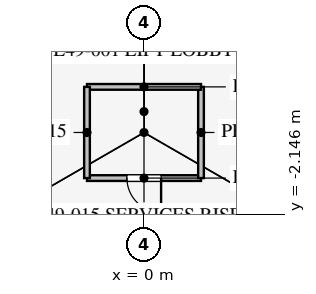
"""IFC4 building model, lengths in metres.
Left out: names, types, materials, properties, quantities, classifications, styles, units other than length and angle.
Written with IfcOpenShell. Run it as: python <this file> out.ifc"""

import sys

from ifc_helpers import new_model, si_unit, direction, frame, frame_2d, origin, place, context, subcontext, project, spatial, rectangle, extrude, element, fill, save


model = new_model("IFC4")
c1 = context("Model", 3, precision=1e-05, world=origin(), true_north=direction((0.0, 1.0)))
c2 = subcontext(c1, "Body", "Model", "MODEL_VIEW")
j1 = project(units=[si_unit("LENGTHUNIT", "METRE"), si_unit("PLANEANGLEUNIT", "RADIAN")], contexts=[c1])
p1 = place(None, origin())
s1 = spatial("IfcSite", under=j1, at=p1, CompositionType="ELEMENT")
p2 = place(p1, origin())
s2 = spatial("IfcBuilding", under=s1, at=p2, CompositionType="ELEMENT")
p3 = place(p2, frame((0.0, 0.0, 214.9)))
s3 = spatial("IfcBuildingStorey", under=s2, at=p3, CompositionType="ELEMENT", Elevation=214.9)
p4 = place(p3, frame((-1.5, -1.2, 0.0), z_axis=(0.0, 0.0, 1.0), x_axis=(1.0, 0.0, 0.0)))
e1 = element("IfcWall", 1, at=p4, inside=s3, PredefinedType="PARTITIONING", context=c2, shape_type="SweptSolid", body=[
    extrude(rectangle(XDim=3.0, YDim=0.15, at=frame_2d((1.5, 0.0))), origin(), (0.0, 0.0, 1.0), 4.0),
])
p5 = place(p4, frame((1.05, 0.0, 0.0)))
e2 = element("IfcOpeningElement", 2, at=p5, cuts=e1, PredefinedType="OPENING", context=c2, shape_type="SweptSolid", body=[
    extrude(rectangle(XDim=0.9, YDim=2.1, at=frame_2d((0.45, 1.05))), frame((0.0, 0.085, 0.0), z_axis=(0.0, -1.0, 0.0), x_axis=(1.0, 0.0, 0.0)), (0.0, 0.0, 1.0), 0.17),
])
p6 = place(p3, frame((1.5, -1.2, 0.0), z_axis=(0.0, 0.0, 1.0), x_axis=(0.0, 1.0, 0.0)))
e3 = element("IfcWall", 3, at=p6, inside=s3, PredefinedType="PARTITIONING", context=c2, shape_type="SweptSolid", body=[
    extrude(rectangle(XDim=2.4, YDim=0.15, at=frame_2d((1.2, 0.0))), origin(), (0.0, 0.0, 1.0), 4.0),
])
p7 = place(p3, frame((1.5, 1.2, 0.0), z_axis=(0.0, 0.0, 1.0), x_axis=(-1.0, 0.0, 0.0)))
e4 = element("IfcWall", 4, at=p7, inside=s3, PredefinedType="PARTITIONING", context=c2, shape_type="SweptSolid", body=[
    extrude(rectangle(XDim=3.0, YDim=0.15, at=frame_2d((1.5, 0.0))), origin(), (0.0, 0.0, 1.0), 4.0),
])
p8 = place(p3, frame((-1.5, 1.2, 0.0), z_axis=(0.0, 0.0, 1.0), x_axis=(0.0, -1.0, 0.0)))
e5 = element("IfcWall", 5, at=p8, inside=s3, PredefinedType="PARTITIONING", context=c2, shape_type="SweptSolid", body=[
    extrude(rectangle(XDim=2.4, YDim=0.15, at=frame_2d((1.2, 0.0))), origin(), (0.0, 0.0, 1.0), 4.0),
])
p9 = place(p3, frame((-0.016, 30.491, 0.0), z_axis=(0.0, 0.0, 1.0), x_axis=(-0.50000091641, -0.866024874695, 0.0)))
e6 = element("IfcWall", 6, at=p9, inside=s3, PredefinedType="PARTITIONING", context=c2, shape_type="SweptSolid", body=[
    extrude(rectangle(XDim=52.796, YDim=0.12, at=frame_2d((26.398, 0.0))), origin(), (0.0, 0.0, 1.0), 2.9),
])
p10 = place(p9, frame((10.2, 0.0, 0.15)))
e7 = element("IfcOpeningElement", 7, at=p10, cuts=e6, PredefinedType="OPENING", context=c2, shape_type="SweptSolid", body=[
    extrude(rectangle(XDim=1.8, YDim=2.1, at=frame_2d((0.9, 1.05))), frame((0.0, 0.07, 0.0), z_axis=(0.0, -1.0, 0.0), x_axis=(1.0, 0.0, 0.0)), (0.0, 0.0, 1.0), 0.14),
])
p11 = place(p9, frame((40.8, 0.0, 0.15)))
e8 = element("IfcOpeningElement", 8, at=p11, cuts=e6, PredefinedType="OPENING", context=c2, shape_type="SweptSolid", body=[
    extrude(rectangle(XDim=1.8, YDim=2.1, at=frame_2d((0.9, 1.05))), frame((0.0, 0.07, 0.0), z_axis=(0.0, -1.0, 0.0), x_axis=(1.0, 0.0, 0.0)), (0.0, 0.0, 1.0), 0.14),
])
p12 = place(p5, frame((0.9, 0.0, 0.0), z_axis=(0.0, 0.0, 1.0), x_axis=(-1.0, 0.0, 0.0)))
e9 = element("IfcDoor", 9, at=p12, inside=s3, OperationType="SINGLE_SWING_LEFT", PredefinedType="DOOR", context=c2, shape_type="SweptSolid", body=[
    extrude(rectangle(XDim=0.9, YDim=2.1, at=frame_2d((0.45, 1.05))), frame((0.0, 0.025, 0.0), z_axis=(0.0, -1.0, 0.0), x_axis=(1.0, 0.0, 0.0)), (0.0, 0.0, 1.0), 0.05),
])
fill(e2, e9)
save(model, sys.argv[1])
